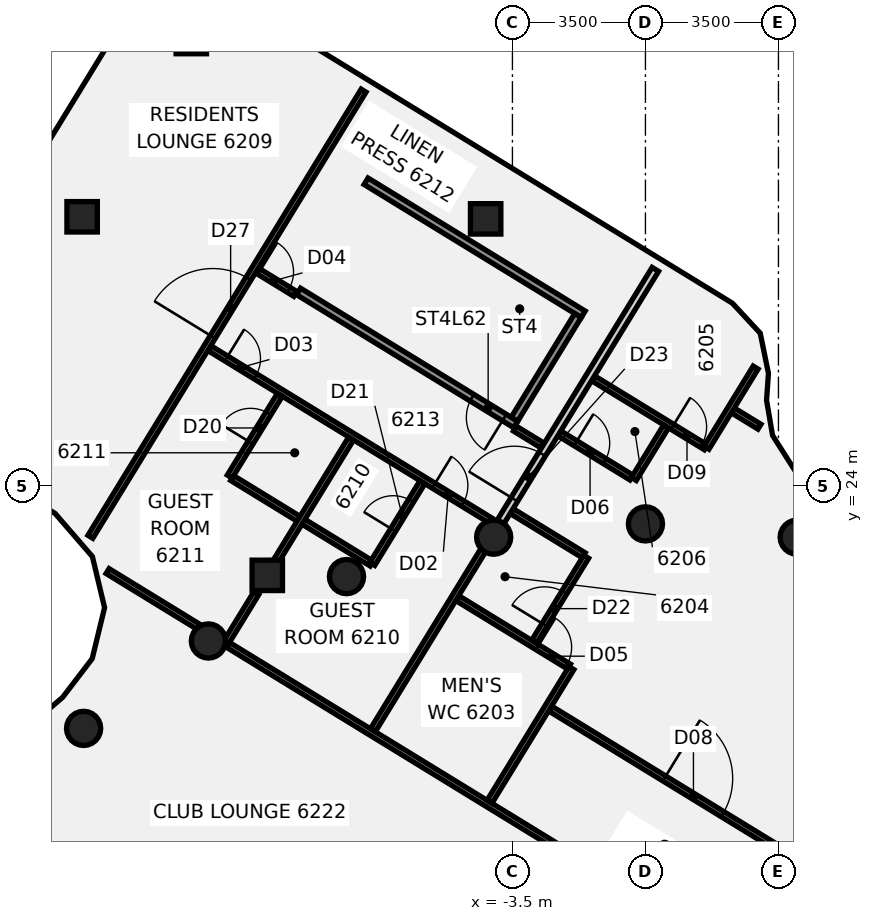
"""IFC4 building model, lengths in metres.
Left out: names, types, materials, properties, quantities, classifications, styles, units other than length and angle.
Written with IfcOpenShell. Run it as: python <this file> out.ifc"""

import sys

from ifc_helpers import new_model, si_unit, direction, frame, frame_2d, origin, origin_2d, place, context, subcontext, project, spatial, polyline, rectangle, circle, outline, extrude, element, fill, save


model = new_model("IFC4")
c1 = context("Model", 3, precision=1e-05, world=origin(), true_north=direction((0.0, 1.0)))
c2 = subcontext(c1, "Body", "Model", "MODEL_VIEW")
j1 = project(units=[si_unit("LENGTHUNIT", "METRE"), si_unit("PLANEANGLEUNIT", "RADIAN")], contexts=[c1])
p1 = place(None, origin())
s1 = spatial("IfcSite", under=j1, at=p1, CompositionType="ELEMENT")
p2 = place(p1, origin())
s2 = spatial("IfcBuilding", under=s1, at=p2, CompositionType="ELEMENT")
p3 = place(p2, frame((0.0, 0.0, 245.1)))
s3 = spatial("IfcBuildingStorey", under=s2, at=p3, CompositionType="ELEMENT", Elevation=245.1)
for number, where, z_axis, x_axis in (
    (1, (3.994, 22.651, -0.14), (0.0, 0.0, 1.0), (1.0, 0.0, 0.0)),
    (2, (0.0, 23.0, -0.14), (0.0, 0.0, 1.0), (1.0, 0.0, 0.0)),
    (3, (-3.994, 22.651, -0.14), (0.0, 0.0, 1.0), (1.0, 0.0, 0.0)),
    (4, (-7.866, 21.613, -0.14), (0.0, 0.0, 1.0), (1.0, 0.0, 0.0)),
    (5, (-11.5, 19.919, -0.14), (0.0, 0.0, 1.0), (1.0, 0.0, 0.0)),
    (6, (-14.784, 17.619, -0.14), (0.0, 0.0, 1.0), (1.0, 0.0, 0.0)),
):
    element("IfcColumn", number, at=place(p3, frame(where, z_axis=z_axis, x_axis=x_axis)), inside=s3, PredefinedType="COLUMN", context=c2, shape_type="SweptSolid", body=[
        extrude(circle(Radius=0.45, at=origin_2d()), origin(), (0.0, 0.0, 1.0), 3.6),
    ])
p4 = place(p3, frame((-9.951, 21.646, -0.139), z_axis=(0.002304349187, -0.050289032263, 0.998732047753), x_axis=(0.521494023038, 0.852234898638, 0.041709249322)))
e7 = element("IfcColumn", 7, at=p4, inside=s3, PredefinedType="COLUMN", context=c2, shape_type="SweptSolid", body=[
    extrude(rectangle(XDim=0.8, YDim=0.8, at=origin_2d()), origin(), (0.0, 0.0, 1.0), 3.602),
])
p5 = place(p3, frame((-4.205, 31.026, -0.139), z_axis=(-0.045479991248, -0.021689414604, 0.998729763094), x_axis=(0.852057085106, -0.522728696962, 0.027448735737)))
e8 = element("IfcColumn", 8, at=p5, inside=s3, PredefinedType="COLUMN", context=c2, shape_type="SweptSolid", body=[
    extrude(rectangle(XDim=0.8, YDim=0.8, at=origin_2d()), origin(), (0.0, 0.0, 1.0), 3.602),
])
p6 = place(p3, frame((-11.95, 35.77, -0.138), z_axis=(0.016732272365, -0.110986242097, 0.993681078177), x_axis=(0.522723880647, 0.84816015737, 0.085930739847)))
e9 = element("IfcColumn", 9, at=p6, inside=s3, PredefinedType="COLUMN", context=c2, shape_type="SweptSolid", body=[
    extrude(rectangle(XDim=0.8, YDim=0.8, at=origin_2d()), origin(), (0.0, 0.0, 1.0), 3.619),
])
p7 = place(p3, frame((-14.823, 31.08, -0.138), z_axis=(0.040318536975, -0.124994195598, 0.991337917485), x_axis=(0.524239786141, 0.84726684636, 0.085507529997)))
e10 = element("IfcColumn", 10, at=p7, inside=s3, PredefinedType="COLUMN", context=c2, shape_type="SweptSolid", body=[
    extrude(rectangle(XDim=0.8, YDim=0.8, at=origin_2d()), origin(), (0.0, 0.0, 1.0), 3.627),
])
p8 = place(p3, frame((-14.153, 21.758, 0.0), z_axis=(0.0, 0.0, 1.0), x_axis=(0.852608746258, -0.522549830929, 0.0)))
e11 = element("IfcWall", 11, at=p8, inside=s3, PredefinedType="PARTITIONING", context=c2, shape_type="SweptSolid", body=[
    extrude(rectangle(XDim=2.809, YDim=0.15, at=frame_2d((1.405, 0.0))), origin(), (0.0, 0.0, 1.0), 2.864),
])
p9 = place(p3, frame((-10.983, 19.815, 0.0), z_axis=(0.0, 0.0, 1.0), x_axis=(0.852616070258, -0.522537880672, 0.0)))
e12 = element("IfcWall", 12, at=p9, inside=s3, PredefinedType="PARTITIONING", context=c2, shape_type="SweptSolid", body=[
    extrude(rectangle(XDim=14.918, YDim=0.15, at=frame_2d((7.459, 0.0))), origin(), (0.0, 0.0, 1.0), 2.864),
])
p10 = place(p3, frame((-10.875, 24.206, 0.0), z_axis=(0.0, 0.0, 1.0), x_axis=(0.852560498392, -0.522628545509, 0.0)))
e13 = element("IfcWall", 13, at=p10, inside=s3, PredefinedType="PARTITIONING", context=c2, shape_type="SweptSolid", body=[
    extrude(rectangle(XDim=4.305, YDim=0.15, at=frame_2d((2.153, 0.0))), origin(), (0.0, 0.0, 1.0), 2.864),
])
p11 = place(p3, frame((-11.473, 27.622, 0.0), z_axis=(0.0, 0.0, 1.0), x_axis=(0.852562421737, -0.522625407957, 0.0)))
e14 = element("IfcWall", 14, at=p11, inside=s3, PredefinedType="PARTITIONING", context=c2, shape_type="SweptSolid", body=[
    extrude(rectangle(XDim=8.675, YDim=0.15, at=frame_2d((4.338, 0.0))), origin(), (0.0, 0.0, 1.0), 2.864),
])
p12 = place(p11, frame((6.921, 0.0, 0.0)))
e15 = element("IfcOpeningElement", 15, at=p12, cuts=e14, PredefinedType="OPENING", context=c2, shape_type="SweptSolid", body=[
    extrude(rectangle(XDim=0.9, YDim=2.1, at=frame_2d((0.45, 1.05))), frame((0.0, 0.085, 0.0), z_axis=(0.0, -1.0, 0.0), x_axis=(1.0, 0.0, 0.0)), (0.0, 0.0, 1.0), 0.17),
])
p13 = place(p11, frame((0.52, 0.0, 0.0)))
e16 = element("IfcOpeningElement", 16, at=p13, cuts=e14, PredefinedType="OPENING", context=c2, shape_type="SweptSolid", body=[
    extrude(rectangle(XDim=0.9, YDim=2.1, at=frame_2d((0.45, 1.05))), frame((0.0, 0.085, 0.0), z_axis=(0.0, -1.0, 0.0), x_axis=(1.0, 0.0, 0.0)), (0.0, 0.0, 1.0), 0.17),
])
p14 = place(p3, frame((-10.22, 29.668, 0.0), z_axis=(0.0, 0.0, 1.0), x_axis=(0.852431711589, -0.522838576501, 0.0)))
e17 = element("IfcWall", 17, at=p14, inside=s3, PredefinedType="PARTITIONING", context=c2, shape_type="SweptSolid", body=[
    extrude(rectangle(XDim=1.18, YDim=0.15, at=frame_2d((0.59, 0.0))), origin(), (0.0, 0.0, 1.0), 2.864),
])
p15 = place(p14, frame((0.07, 0.0, 0.0)))
e18 = element("IfcOpeningElement", 18, at=p15, cuts=e17, PredefinedType="OPENING", context=c2, shape_type="SweptSolid", body=[
    extrude(rectangle(XDim=0.9, YDim=2.1, at=frame_2d((0.45, 1.05))), frame((0.0, 0.085, 0.0), z_axis=(0.0, -1.0, 0.0), x_axis=(1.0, 0.0, 0.0)), (0.0, 0.0, 1.0), 0.17),
])
p16 = place(p3, frame((-3.434, 25.507, 0.0), z_axis=(0.0, 0.0, 1.0), x_axis=(0.852319855047, -0.523020902731, 0.0)))
e19 = element("IfcWall", 19, at=p16, inside=s3, PredefinedType="PARTITIONING", context=c2, shape_type="SweptSolid", body=[
    extrude(rectangle(XDim=0.861, YDim=0.15, at=frame_2d((0.43, 0.0))), origin(), (0.0, 0.0, 1.0), 2.864),
])
p17 = place(p3, frame((-4.948, 21.044, 0.0), z_axis=(0.0, 0.0, 1.0), x_axis=(0.85258902817, -0.52258200222, 0.0)))
e20 = element("IfcWall", 20, at=p17, inside=s3, PredefinedType="PARTITIONING", context=c2, shape_type="SweptSolid", body=[
    extrude(rectangle(XDim=3.445, YDim=0.15, at=frame_2d((1.722, 0.0))), origin(), (0.0, 0.0, 1.0), 2.864),
])
p18 = place(p17, frame((2.469, 0.0, 0.0)))
e21 = element("IfcOpeningElement", 21, at=p18, cuts=e20, PredefinedType="OPENING", context=c2, shape_type="SweptSolid", body=[
    extrude(rectangle(XDim=0.9, YDim=2.1, at=frame_2d((0.45, 1.05))), frame((0.0, 0.085, 0.0), z_axis=(0.0, -1.0, 0.0), x_axis=(1.0, 0.0, 0.0)), (0.0, 0.0, 1.0), 0.17),
])
p19 = place(p3, frame((-2.267, 25.383, 0.0), z_axis=(0.0, 0.0, 1.0), x_axis=(0.852583902446, -0.522590364712, 0.0)))
e22 = element("IfcWall", 22, at=p19, inside=s3, PredefinedType="PARTITIONING", context=c2, shape_type="SweptSolid", body=[
    extrude(rectangle(XDim=2.225, YDim=0.15, at=frame_2d((1.112, 0.0))), origin(), (0.0, 0.0, 1.0), 2.864),
])
p20 = place(p19, frame((0.5, 0.0, 0.0)))
e23 = element("IfcOpeningElement", 23, at=p20, cuts=e22, PredefinedType="OPENING", context=c2, shape_type="SweptSolid", body=[
    extrude(rectangle(XDim=0.9, YDim=2.1, at=frame_2d((0.45, 1.05))), frame((0.0, 0.085, 0.0), z_axis=(0.0, -1.0, 0.0), x_axis=(1.0, 0.0, 0.0)), (0.0, 0.0, 1.0), 0.17),
])
p21 = place(p3, frame((-3.521, 23.336, 0.0), z_axis=(0.0, 0.0, 1.0), x_axis=(0.852703717401, -0.522394841408, 0.0)))
e24 = element("IfcWall", 24, at=p21, inside=s3, PredefinedType="PARTITIONING", context=c2, shape_type="SweptSolid", body=[
    extrude(rectangle(XDim=2.226, YDim=0.15, at=frame_2d((1.113, 0.0))), origin(), (0.0, 0.0, 1.0), 2.864),
])
p22 = place(p3, frame((-2.506, 18.14, 0.0), z_axis=(0.0, 0.0, 1.0), x_axis=(0.85272401736, -0.522361704393, 0.0)))
e25 = element("IfcWall", 25, at=p22, inside=s3, PredefinedType="PARTITIONING", context=c2, shape_type="SweptSolid", body=[
    extrude(rectangle(XDim=11.716, YDim=0.15, at=frame_2d((5.858, 0.0))), origin(), (0.0, 0.0, 1.0), 2.864),
])
p23 = place(p22, frame((3.52, 0.0, 0.0)))
e26 = element("IfcOpeningElement", 26, at=p23, cuts=e25, PredefinedType="OPENING", context=c2, shape_type="SweptSolid", body=[
    extrude(rectangle(XDim=1.8, YDim=2.1, at=frame_2d((0.9, 1.05))), frame((0.0, 0.085, 0.0), z_axis=(0.0, -1.0, 0.0), x_axis=(1.0, 0.0, 0.0)), (0.0, 0.0, 1.0), 0.17),
])
p24 = place(p3, frame((-1.375, 26.829, 0.0), z_axis=(0.0, 0.0, 1.0), x_axis=(0.852802133987, -0.522234162294, 0.0)))
e27 = element("IfcWall", 27, at=p24, inside=s3, PredefinedType="PARTITIONING", context=c2, shape_type="SweptSolid", body=[
    extrude(rectangle(XDim=3.475, YDim=0.15, at=frame_2d((1.737, 0.0))), origin(), (0.0, 0.0, 1.0), 2.864),
])
p25 = place(p24, frame((2.444, 0.0, 0.0)))
e28 = element("IfcOpeningElement", 28, at=p25, cuts=e27, PredefinedType="OPENING", context=c2, shape_type="SweptSolid", body=[
    extrude(rectangle(XDim=0.9, YDim=2.1, at=frame_2d((0.45, 1.05))), frame((0.0, 0.085, 0.0), z_axis=(0.0, -1.0, 0.0), x_axis=(1.0, 0.0, 0.0)), (0.0, 0.0, 1.0), 0.17),
])
p26 = place(p3, frame((2.3, 25.985, 0.0), z_axis=(0.0, 0.0, 1.0), x_axis=(0.852972911954, -0.521955181478, 0.0)))
e29 = element("IfcWall", 29, at=p26, inside=s3, PredefinedType="PARTITIONING", context=c2, shape_type="SweptSolid", body=[
    extrude(rectangle(XDim=0.821, YDim=0.15, at=frame_2d((0.41, 0.0))), origin(), (0.0, 0.0, 1.0), 2.864),
])
p27 = place(p3, frame((-10.939, 24.245, 0.0), z_axis=(0.0, 0.0, 1.0), x_axis=(0.522621117444, 0.85256505183, 0.0)))
e30 = element("IfcWall", 30, at=p27, inside=s3, PredefinedType="PARTITIONING", context=c2, shape_type="SweptSolid", body=[
    extrude(rectangle(XDim=2.52, YDim=0.15, at=frame_2d((1.26, 0.0))), origin(), (0.0, 0.0, 1.0), 2.864),
])
p28 = place(p27, frame((1.05, 0.0, 0.0)))
e31 = element("IfcOpeningElement", 31, at=p28, cuts=e30, PredefinedType="OPENING", context=c2, shape_type="SweptSolid", body=[
    extrude(rectangle(XDim=0.9, YDim=2.1, at=frame_2d((0.45, 1.05))), frame((0.0, 0.085, 0.0), z_axis=(0.0, -1.0, 0.0), x_axis=(1.0, 0.0, 0.0)), (0.0, 0.0, 1.0), 0.17),
])
p29 = place(p3, frame((-11.049, 19.855, 0.0), z_axis=(0.0, 0.0, 1.0), x_axis=(0.5226912647, 0.852522047695, 0.0)))
e32 = element("IfcWall", 32, at=p29, inside=s3, PredefinedType="PARTITIONING", context=c2, shape_type="SweptSolid", body=[
    extrude(rectangle(XDim=1.551, YDim=0.15, at=frame_2d((0.775, 0.0))), origin(), (0.0, 0.0, 1.0), 2.864),
])
p30 = place(p3, frame((-9.74, 21.99, 0.0), z_axis=(0.0, 0.0, 1.0), x_axis=(0.522590556225, 0.852583785058, 0.0)))
e33 = element("IfcWall", 33, at=p30, inside=s3, PredefinedType="PARTITIONING", context=c2, shape_type="SweptSolid", body=[
    extrude(rectangle(XDim=3.817, YDim=0.15, at=frame_2d((1.908, 0.0))), origin(), (0.0, 0.0, 1.0), 2.864),
])
p31 = place(p3, frame((-7.187, 21.946, 0.0), z_axis=(0.0, 0.0, 1.0), x_axis=(0.522621117444, 0.85256505183, 0.0)))
e34 = element("IfcWall", 34, at=p31, inside=s3, PredefinedType="PARTITIONING", context=c2, shape_type="SweptSolid", body=[
    extrude(rectangle(XDim=2.52, YDim=0.15, at=frame_2d((1.26, 0.0))), origin(), (0.0, 0.0, 1.0), 2.864),
])
p32 = place(p31, frame((1.05, 0.0, 0.0)))
e35 = element("IfcOpeningElement", 35, at=p32, cuts=e34, PredefinedType="OPENING", context=c2, shape_type="SweptSolid", body=[
    extrude(rectangle(XDim=0.9, YDim=2.1, at=frame_2d((0.45, 1.05))), frame((0.0, 0.085, 0.0), z_axis=(0.0, -1.0, 0.0), x_axis=(1.0, 0.0, 0.0)), (0.0, 0.0, 1.0), 0.17),
])
p33 = place(p3, frame((-2.928, 19.9, 0.0), z_axis=(0.0, 0.0, 1.0), x_axis=(0.522557687872, 0.852603930818, 0.0)))
e36 = element("IfcWall", 36, at=p33, inside=s3, PredefinedType="PARTITIONING", context=c2, shape_type="SweptSolid", body=[
    extrude(rectangle(XDim=2.62, YDim=0.15, at=frame_2d((1.31, 0.0))), origin(), (0.0, 0.0, 1.0), 2.864),
])
p34 = place(p33, frame((0.52, 0.0, 0.0)))
e37 = element("IfcOpeningElement", 37, at=p34, cuts=e36, PredefinedType="OPENING", context=c2, shape_type="SweptSolid", body=[
    extrude(rectangle(XDim=1.0, YDim=2.1, at=frame_2d((0.5, 1.05))), frame((0.0, 0.085, 0.0), z_axis=(0.0, -1.0, 0.0), x_axis=(1.0, 0.0, 0.0)), (0.0, 0.0, 1.0), 0.17),
])
p35 = place(p3, frame((-0.305, 24.18, 0.0), z_axis=(0.0, 0.0, 1.0), x_axis=(0.522516127408, 0.852629401674, 0.0)))
e38 = element("IfcWall", 38, at=p35, inside=s3, PredefinedType="PARTITIONING", context=c2, shape_type="SweptSolid", body=[
    extrude(rectangle(XDim=1.62, YDim=0.15, at=frame_2d((0.81, 0.0))), origin(), (0.0, 0.0, 1.0), 2.864),
])
p36 = place(p3, frame((-7.17, 17.573, 0.0), z_axis=(0.0, 0.0, 1.0), x_axis=(0.522586882087, 0.852586037107, 0.0)))
e39 = element("IfcWall", 39, at=p36, inside=s3, PredefinedType="PARTITIONING", context=c2, shape_type="SweptSolid", body=[
    extrude(rectangle(XDim=5.765, YDim=0.15, at=frame_2d((2.883, 0.0))), origin(), (0.0, 0.0, 1.0), 2.864),
])
p37 = place(p3, frame((-3.922, 22.872, 0.0), z_axis=(0.0, 0.0, 1.0), x_axis=(0.522556335617, 0.852604759608, 0.0)))
e40 = element("IfcWall", 40, at=p37, inside=s3, PredefinedType="PARTITIONING", context=c2, shape_type="SweptSolid", body=[
    extrude(rectangle(XDim=8.004, YDim=0.2, at=frame_2d((4.002, 0.0))), origin(), (0.0, 0.0, 1.0), 2.864),
])
p38 = place(p37, frame((0.905, 0.0, 0.0)))
e41 = element("IfcOpeningElement", 41, at=p38, cuts=e40, PredefinedType="OPENING", context=c2, shape_type="SweptSolid", body=[
    extrude(rectangle(XDim=1.4, YDim=2.1, at=frame_2d((0.7, 1.05))), frame((0.0, 0.11, 0.0), z_axis=(0.0, -1.0, 0.0), x_axis=(1.0, 0.0, 0.0)), (0.0, 0.0, 1.0), 0.22),
])
p39 = place(p3, frame((-4.102, 15.688, 0.0), z_axis=(0.0, 0.0, 1.0), x_axis=(0.522524582704, 0.852624219965, 0.0)))
e42 = element("IfcWall", 42, at=p39, inside=s3, PredefinedType="PARTITIONING", context=c2, shape_type="SweptSolid", body=[
    extrude(rectangle(XDim=4.125, YDim=0.15, at=frame_2d((2.062, 0.0))), origin(), (0.0, 0.0, 1.0), 2.864),
])
p40 = place(p3, frame((1.607, 25.003, 0.0), z_axis=(0.0, 0.0, 1.0), x_axis=(0.522543541311, 0.852612601029, 0.0)))
e43 = element("IfcWall", 43, at=p40, inside=s3, PredefinedType="PARTITIONING", context=c2, shape_type="SweptSolid", body=[
    extrude(rectangle(XDim=2.473, YDim=0.15, at=frame_2d((1.237, 0.0))), origin(), (0.0, 0.0, 1.0), 2.864),
])
p41 = place(p3, frame((-14.606, 22.661, 0.0), z_axis=(0.0, 0.0, 1.0), x_axis=(0.522270484335, 0.852779890237, 0.0)))
e44 = element("IfcWall", 44, at=p41, inside=s3, PredefinedType="PARTITIONING", context=c2, shape_type="SweptSolid", body=[
    extrude(rectangle(XDim=13.765, YDim=0.15, at=frame_2d((6.883, 0.0))), origin(), (0.0, 0.0, 1.0), 2.864),
])
p42 = place(p41, frame((6.166, 0.0, 0.0)))
e45 = element("IfcOpeningElement", 45, at=p42, cuts=e44, PredefinedType="OPENING", context=c2, shape_type="SweptSolid", body=[
    extrude(rectangle(XDim=1.8, YDim=2.1, at=frame_2d((0.9, 1.05))), frame((0.0, 0.085, 0.0), z_axis=(0.0, -1.0, 0.0), x_axis=(1.0, 0.0, 0.0)), (0.0, 0.0, 1.0), 0.17),
])
p43 = place(p3, frame((-3.414, 25.616, -0.14), z_axis=(0.0, 0.0, 1.0), x_axis=(-0.852723778583, 0.522362094183, 0.0)))
e46 = element("IfcWall", 46, at=p43, inside=s3, PredefinedType="SHEAR", context=c2, shape_type="SweptSolid", body=[
    extrude(rectangle(XDim=6.7, YDim=0.2, at=frame_2d((3.35, 0.0))), origin(), (0.0, 0.0, 1.0), 3.004),
])
p44 = place(p43, frame((0.35, 0.0, 0.0)))
e47 = element("IfcOpeningElement", 47, at=p44, cuts=e46, PredefinedType="OPENING", context=c2, shape_type="SweptSolid", body=[
    extrude(rectangle(XDim=1.0, YDim=2.1, at=frame_2d((0.5, 1.05))), frame((0.0, 0.11, 0.0), z_axis=(0.0, -1.0, 0.0), x_axis=(1.0, 0.0, 0.0)), (0.0, 0.0, 1.0), 0.22),
])
p45 = place(p3, frame((-1.638, 28.515, -0.14), z_axis=(0.0, 0.0, 1.0), x_axis=(-0.852733721115, 0.522345863268, 0.0)))
e48 = element("IfcWall", 48, at=p45, inside=s3, PredefinedType="SHEAR", context=c2, shape_type="SweptSolid", body=[
    extrude(rectangle(XDim=6.7, YDim=0.2, at=frame_2d((3.35, 0.0))), origin(), (0.0, 0.0, 1.0), 3.004),
])
p46 = place(p3, frame((-1.775, 28.482, -0.14), z_axis=(0.0, 0.0, 1.0), x_axis=(-0.52237241109, -0.852717458559, 0.0)))
e49 = element("IfcWall", 49, at=p46, inside=s3, PredefinedType="SHEAR", context=c2, shape_type="SweptSolid", body=[
    extrude(rectangle(XDim=3.2, YDim=0.2, at=frame_2d((1.6, 0.0))), origin(), (0.0, 0.0, 1.0), 3.6),
])
p47 = place(p3, frame((0.0, 0.0, -0.14)))
e50 = element("IfcWall", 50, at=p47, inside=s3, PredefinedType="SHEAR", context=c2, shape_type="SweptSolid", body=[
    extrude(outline(polyline([(-7.233, 31.825), (-7.403, 31.93), (-9.075, 29.201), (-8.904, 29.097), (-7.233, 31.825)])), origin(), (0.0, 0.0, 1.0), 3.004),
])
p48 = place(p12, frame((0.9, 0.0, 0.0), z_axis=(0.0, 0.0, 1.0), x_axis=(-1.0, 0.0, 0.0)))
e51 = element("IfcDoor", 51, at=p48, inside=s3, OperationType="SINGLE_SWING_RIGHT", PredefinedType="DOOR", context=c2, shape_type="SweptSolid", body=[
    extrude(rectangle(XDim=0.9, YDim=2.1, at=frame_2d((0.45, 1.05))), frame((0.0, 0.025, 0.0), z_axis=(0.0, -1.0, 0.0), x_axis=(1.0, 0.0, 0.0)), (0.0, 0.0, 1.0), 0.05),
])
fill(e15, e51)
p49 = place(p13, frame((0.9, 0.0, 0.0), z_axis=(0.0, 0.0, 1.0), x_axis=(-1.0, 0.0, 0.0)))
e52 = element("IfcDoor", 52, at=p49, inside=s3, OperationType="SINGLE_SWING_LEFT", PredefinedType="DOOR", context=c2, shape_type="SweptSolid", body=[
    extrude(rectangle(XDim=0.9, YDim=2.1, at=frame_2d((0.45, 1.05))), frame((0.0, 0.025, 0.0), z_axis=(0.0, -1.0, 0.0), x_axis=(1.0, 0.0, 0.0)), (0.0, 0.0, 1.0), 0.05),
])
fill(e16, e52)
p50 = place(p15, origin())
e53 = element("IfcDoor", 53, at=p50, inside=s3, OperationType="SINGLE_SWING_RIGHT", PredefinedType="DOOR", context=c2, shape_type="SweptSolid", body=[
    extrude(rectangle(XDim=0.9, YDim=2.1, at=frame_2d((0.45, 1.05))), frame((0.0, 0.025, 0.0), z_axis=(0.0, -1.0, 0.0), x_axis=(1.0, 0.0, 0.0)), (0.0, 0.0, 1.0), 0.05),
])
fill(e18, e53)
p51 = place(p18, frame((0.9, 0.0, 0.0), z_axis=(0.0, 0.0, 1.0), x_axis=(-1.0, 0.0, 0.0)))
e54 = element("IfcDoor", 54, at=p51, inside=s3, OperationType="SINGLE_SWING_RIGHT", PredefinedType="DOOR", context=c2, shape_type="SweptSolid", body=[
    extrude(rectangle(XDim=0.9, YDim=2.1, at=frame_2d((0.45, 1.05))), frame((0.0, 0.025, 0.0), z_axis=(0.0, -1.0, 0.0), x_axis=(1.0, 0.0, 0.0)), (0.0, 0.0, 1.0), 0.05),
])
fill(e21, e54)
p52 = place(p20, origin())
e55 = element("IfcDoor", 55, at=p52, inside=s3, OperationType="SINGLE_SWING_RIGHT", PredefinedType="DOOR", context=c2, shape_type="SweptSolid", body=[
    extrude(rectangle(XDim=0.9, YDim=2.1, at=frame_2d((0.45, 1.05))), frame((0.0, 0.025, 0.0), z_axis=(0.0, -1.0, 0.0), x_axis=(1.0, 0.0, 0.0)), (0.0, 0.0, 1.0), 0.05),
])
fill(e23, e55)
p53 = place(p23, frame((1.8, 0.0, 0.0), z_axis=(0.0, 0.0, 1.0), x_axis=(-1.0, 0.0, 0.0)))
e56 = element("IfcDoor", 56, at=p53, inside=s3, OperationType="DOUBLE_DOOR_SINGLE_SWING", PredefinedType="DOOR", context=c2, shape_type="SweptSolid", body=[
    extrude(rectangle(XDim=1.8, YDim=2.1, at=frame_2d((0.9, 1.05))), frame((0.0, 0.025, 0.0), z_axis=(0.0, -1.0, 0.0), x_axis=(1.0, 0.0, 0.0)), (0.0, 0.0, 1.0), 0.05),
])
fill(e26, e56)
p54 = place(p25, origin())
e57 = element("IfcDoor", 57, at=p54, inside=s3, OperationType="SINGLE_SWING_LEFT", PredefinedType="DOOR", context=c2, shape_type="SweptSolid", body=[
    extrude(rectangle(XDim=0.9, YDim=2.1, at=frame_2d((0.45, 1.05))), frame((0.0, 0.025, 0.0), z_axis=(0.0, -1.0, 0.0), x_axis=(1.0, 0.0, 0.0)), (0.0, 0.0, 1.0), 0.05),
])
fill(e28, e57)
p55 = place(p28, frame((0.9, 0.0, 0.0), z_axis=(0.0, 0.0, 1.0), x_axis=(-1.0, 0.0, 0.0)))
e58 = element("IfcDoor", 58, at=p55, inside=s3, OperationType="SINGLE_SWING_RIGHT", PredefinedType="DOOR", context=c2, shape_type="SweptSolid", body=[
    extrude(rectangle(XDim=0.9, YDim=2.1, at=frame_2d((0.45, 1.05))), frame((0.0, 0.025, 0.0), z_axis=(0.0, -1.0, 0.0), x_axis=(1.0, 0.0, 0.0)), (0.0, 0.0, 1.0), 0.05),
])
fill(e31, e58)
p56 = place(p32, origin())
e59 = element("IfcDoor", 59, at=p56, inside=s3, OperationType="SINGLE_SWING_LEFT", PredefinedType="DOOR", context=c2, shape_type="SweptSolid", body=[
    extrude(rectangle(XDim=0.9, YDim=2.1, at=frame_2d((0.45, 1.05))), frame((0.0, 0.025, 0.0), z_axis=(0.0, -1.0, 0.0), x_axis=(1.0, 0.0, 0.0)), (0.0, 0.0, 1.0), 0.05),
])
fill(e35, e59)
p57 = place(p34, origin())
e60 = element("IfcDoor", 60, at=p57, inside=s3, OperationType="SINGLE_SWING_RIGHT", PredefinedType="DOOR", context=c2, shape_type="SweptSolid", body=[
    extrude(rectangle(XDim=1.0, YDim=2.1, at=frame_2d((0.5, 1.05))), frame((0.0, 0.025, 0.0), z_axis=(0.0, -1.0, 0.0), x_axis=(1.0, 0.0, 0.0)), (0.0, 0.0, 1.0), 0.05),
])
fill(e37, e60)
p58 = place(p38, frame((1.4, 0.0, 0.0), z_axis=(0.0, 0.0, 1.0), x_axis=(-1.0, 0.0, 0.0)))
e61 = element("IfcDoor", 61, at=p58, inside=s3, OperationType="DOUBLE_DOOR_SINGLE_SWING", PredefinedType="DOOR", context=c2, shape_type="SweptSolid", body=[
    extrude(rectangle(XDim=1.4, YDim=2.1, at=frame_2d((0.7, 1.05))), frame((0.0, 0.025, 0.0), z_axis=(0.0, -1.0, 0.0), x_axis=(1.0, 0.0, 0.0)), (0.0, 0.0, 1.0), 0.05),
])
fill(e41, e61)
p59 = place(p42, origin())
e62 = element("IfcDoor", 62, at=p59, inside=s3, OperationType="DOUBLE_DOOR_SINGLE_SWING", PredefinedType="DOOR", context=c2, shape_type="SweptSolid", body=[
    extrude(rectangle(XDim=1.8, YDim=2.1, at=frame_2d((0.9, 1.05))), frame((0.0, 0.025, 0.0), z_axis=(0.0, -1.0, 0.0), x_axis=(1.0, 0.0, 0.0)), (0.0, 0.0, 1.0), 0.05),
])
fill(e45, e62)
p60 = place(p44, origin())
e63 = element("IfcDoor", 63, at=p60, inside=s3, OperationType="SINGLE_SWING_LEFT", PredefinedType="DOOR", context=c2, shape_type="SweptSolid", body=[
    extrude(rectangle(XDim=1.0, YDim=2.1, at=frame_2d((0.5, 1.05))), frame((0.0, 0.025, 0.0), z_axis=(0.0, -1.0, 0.0), x_axis=(1.0, 0.0, 0.0)), (0.0, 0.0, 1.0), 0.05),
])
fill(e47, e63)
save(model, sys.argv[1])
